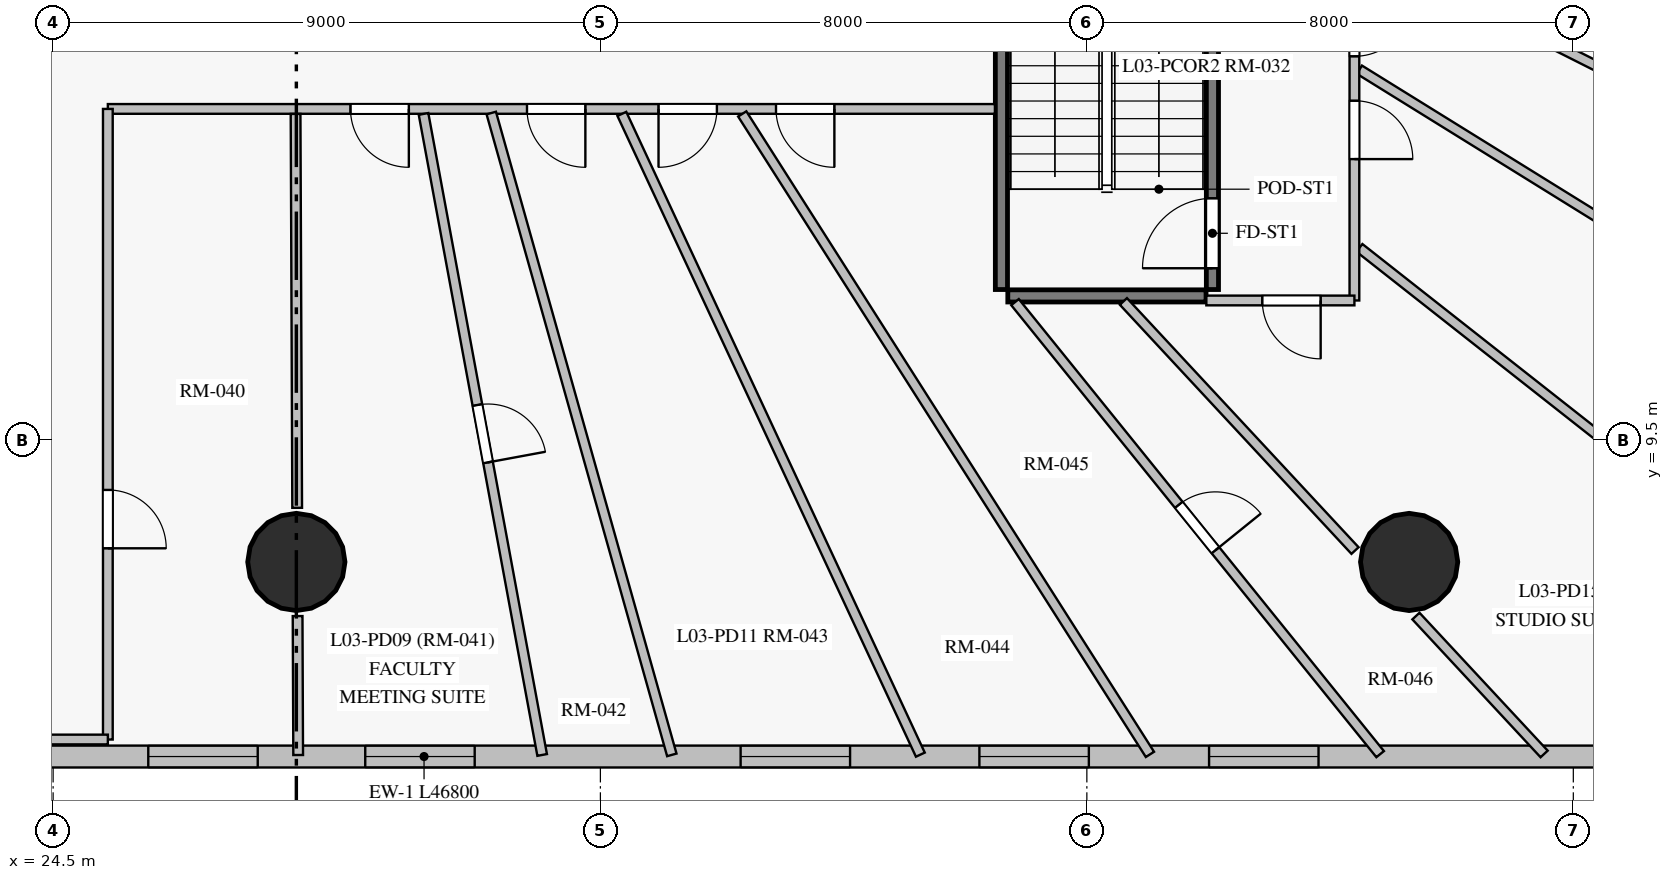
"""IFC4 building model, lengths in metres.
Left out: names, types, materials, properties, quantities, classifications, styles, units other than length and angle.
Written with IfcOpenShell. Run it as: python <this file> out.ifc"""

import sys

from ifc_helpers import new_model, si_unit, direction, frame, frame_2d, origin, origin_with_axes, origin_2d, place, context, subcontext, project, spatial, rectangle, circle, extrude, source, transform, mapped, element, fill, save


model = new_model("IFC4")
c1 = context("Model", 3, precision=1e-05, world=origin(), true_north=direction((0.0, 1.0)))
c2 = subcontext(c1, "Body", "Model", "MODEL_VIEW")
j1 = project(units=[si_unit("LENGTHUNIT", "METRE"), si_unit("PLANEANGLEUNIT", "RADIAN")], contexts=[c1])
p1 = place(None, origin())
s1 = spatial("IfcSite", under=j1, at=p1, CompositionType="ELEMENT")
p2 = place(p1, origin())
s2 = spatial("IfcBuilding", under=s1, at=p2, CompositionType="ELEMENT")
p3 = place(p2, frame((0.0, 0.0, 13.5)))
s3 = spatial("IfcBuildingStorey", under=s2, at=p3, CompositionType="ELEMENT", Elevation=13.5)
m1 = source(origin_with_axes(), c2, "Body", "SweptSolid", [
    extrude(circle(Radius=0.8, at=origin_2d()), origin(), (0.0, 0.0, 1.0), 4.5),
])
for number, where, z_axis, x_axis in (
    (1, (28.5, 7.5, 0.0), (0.0, 0.0, 1.0), (1.0, 0.0, 0.0)),
    (2, (46.8, 7.5, 0.0), (0.0, 0.0, 1.0), (1.0, 0.0, 0.0)),
):
    element("IfcColumn", number, at=place(p3, frame(where, z_axis=z_axis, x_axis=x_axis)), inside=s3, PredefinedType="COLUMN", context=c2, shape_type="MappedRepresentation", body=[
        mapped(m1, transform((0.0, 0.0, 0.0), scale=1.0)),
    ])
p4 = place(p3, frame((7.2, 4.3, 0.0), z_axis=(0.0, 0.0, 1.0), x_axis=(1.0, 0.0, 0.0)))
e3 = element("IfcWall", 3, at=p4, inside=s3, PredefinedType="SOLIDWALL", context=c2, shape_type="SweptSolid", body=[
    extrude(rectangle(XDim=46.8, YDim=0.36, at=frame_2d((23.4, 0.0))), origin(), (0.0, 0.0, 1.0), 4.225),
])
p5 = place(p4, frame((3.305, 0.0, 0.85)))
e4 = element("IfcOpeningElement", 4, at=p5, cuts=e3, PredefinedType="OPENING", context=c2, shape_type="SweptSolid", body=[
    extrude(rectangle(XDim=1.8, YDim=2.2, at=frame_2d((0.9, 1.1))), frame((0.0, 0.19, 0.0), z_axis=(0.0, -1.0, 0.0), x_axis=(1.0, 0.0, 0.0)), (0.0, 0.0, 1.0), 0.38),
])
p6 = place(p4, frame((9.709, 0.0, 0.85)))
e5 = element("IfcOpeningElement", 5, at=p6, cuts=e3, PredefinedType="OPENING", context=c2, shape_type="SweptSolid", body=[
    extrude(rectangle(XDim=1.8, YDim=2.2, at=frame_2d((0.9, 1.1))), frame((0.0, 0.19, 0.0), z_axis=(0.0, -1.0, 0.0), x_axis=(1.0, 0.0, 0.0)), (0.0, 0.0, 1.0), 0.38),
])
p7 = place(p4, frame((15.2, 0.0, 0.85)))
e6 = element("IfcOpeningElement", 6, at=p7, cuts=e3, PredefinedType="OPENING", context=c2, shape_type="SweptSolid", body=[
    extrude(rectangle(XDim=1.8, YDim=2.2, at=frame_2d((0.9, 1.1))), frame((0.0, 0.19, 0.0), z_axis=(0.0, -1.0, 0.0), x_axis=(1.0, 0.0, 0.0)), (0.0, 0.0, 1.0), 0.38),
])
p8 = place(p4, frame((18.865, 0.0, 0.85)))
e7 = element("IfcOpeningElement", 7, at=p8, cuts=e3, PredefinedType="OPENING", context=c2, shape_type="SweptSolid", body=[
    extrude(rectangle(XDim=1.8, YDim=2.2, at=frame_2d((0.9, 1.1))), frame((0.0, 0.19, 0.0), z_axis=(0.0, -1.0, 0.0), x_axis=(1.0, 0.0, 0.0)), (0.0, 0.0, 1.0), 0.38),
])
p9 = place(p4, frame((22.433, 0.0, 0.85)))
e8 = element("IfcOpeningElement", 8, at=p9, cuts=e3, PredefinedType="OPENING", context=c2, shape_type="SweptSolid", body=[
    extrude(rectangle(XDim=1.8, YDim=2.2, at=frame_2d((0.9, 1.1))), frame((0.0, 0.19, 0.0), z_axis=(0.0, -1.0, 0.0), x_axis=(1.0, 0.0, 0.0)), (0.0, 0.0, 1.0), 0.38),
])
p10 = place(p4, frame((28.606, 0.0, 0.85)))
e9 = element("IfcOpeningElement", 9, at=p10, cuts=e3, PredefinedType="OPENING", context=c2, shape_type="SweptSolid", body=[
    extrude(rectangle(XDim=1.8, YDim=2.2, at=frame_2d((0.9, 1.1))), frame((0.0, 0.19, 0.0), z_axis=(0.0, -1.0, 0.0), x_axis=(1.0, 0.0, 0.0)), (0.0, 0.0, 1.0), 0.38),
])
p11 = place(p4, frame((32.533, 0.0, 0.85)))
e10 = element("IfcOpeningElement", 10, at=p11, cuts=e3, PredefinedType="OPENING", context=c2, shape_type="SweptSolid", body=[
    extrude(rectangle(XDim=1.8, YDim=2.2, at=frame_2d((0.9, 1.1))), frame((0.0, 0.19, 0.0), z_axis=(0.0, -1.0, 0.0), x_axis=(1.0, 0.0, 0.0)), (0.0, 0.0, 1.0), 0.38),
])
p12 = place(p4, frame((36.31, 0.0, 0.85)))
e11 = element("IfcOpeningElement", 11, at=p12, cuts=e3, PredefinedType="OPENING", context=c2, shape_type="SweptSolid", body=[
    extrude(rectangle(XDim=1.8, YDim=2.2, at=frame_2d((0.9, 1.1))), frame((0.0, 0.19, 0.0), z_axis=(0.0, -1.0, 0.0), x_axis=(1.0, 0.0, 0.0)), (0.0, 0.0, 1.0), 0.38),
])
p13 = place(p4, frame((43.283, 0.0, 0.85)))
e12 = element("IfcOpeningElement", 12, at=p13, cuts=e3, PredefinedType="OPENING", context=c2, shape_type="SweptSolid", body=[
    extrude(rectangle(XDim=1.8, YDim=2.2, at=frame_2d((0.9, 1.1))), frame((0.0, 0.19, 0.0), z_axis=(0.0, -1.0, 0.0), x_axis=(1.0, 0.0, 0.0)), (0.0, 0.0, 1.0), 0.38),
])
p14 = place(p3, frame((40.095, 11.98, 0.0), z_axis=(0.0, 0.0, 1.0), x_axis=(0.0, 1.0, 0.0)))
e13 = element("IfcWall", 13, at=p14, inside=s3, PredefinedType="SHEAR", context=c2, shape_type="SweptSolid", body=[
    extrude(rectangle(XDim=7.35, YDim=0.2, at=frame_2d((3.675, 0.0))), origin(), (0.0, 0.0, 1.0), 4.225),
])
p15 = place(p3, frame((43.565, 11.98, 0.0), z_axis=(0.0, 0.0, 1.0), x_axis=(0.0, 1.0, 0.0)))
e14 = element("IfcWall", 14, at=p15, inside=s3, PredefinedType="SHEAR", context=c2, shape_type="SweptSolid", body=[
    extrude(rectangle(XDim=7.35, YDim=0.2, at=frame_2d((3.675, 0.0))), origin(), (0.0, 0.0, 1.0), 4.225),
])
p16 = place(p15, frame((0.35, 0.0, 0.0)))
e15 = element("IfcOpeningElement", 15, at=p16, cuts=e14, PredefinedType="OPENING", context=c2, shape_type="SweptSolid", body=[
    extrude(rectangle(XDim=1.15, YDim=2.15, at=frame_2d((0.575, 1.075))), frame((0.0, 0.11, 0.0), z_axis=(0.0, -1.0, 0.0), x_axis=(1.0, 0.0, 0.0)), (0.0, 0.0, 1.0), 0.22),
])
p17 = place(p3, frame((40.2, 11.875, 0.0), z_axis=(0.0, 0.0, 1.0), x_axis=(1.0, 0.0, 0.0)))
e16 = element("IfcWall", 16, at=p17, inside=s3, PredefinedType="SHEAR", context=c2, shape_type="SweptSolid", body=[
    extrude(rectangle(XDim=3.26, YDim=0.2, at=frame_2d((1.63, 0.0))), origin(), (0.0, 0.0, 1.0), 4.225),
])
p18 = place(p3, frame((39.988, 14.95, 0.0), z_axis=(0.0, 0.0, 1.0), x_axis=(-1.0, 0.0, 0.0)))
e17 = element("IfcWall", 17, at=p18, inside=s3, PredefinedType="PARTITIONING", context=c2, shape_type="SweptSolid", body=[
    extrude(rectangle(XDim=14.588, YDim=0.16, at=frame_2d((7.294, 0.0))), origin(), (0.0, 0.0, 1.0), 4.225),
])
p19 = place(p18, frame((9.638, 0.0, 0.0)))
e18 = element("IfcOpeningElement", 18, at=p19, cuts=e17, PredefinedType="OPENING", context=c2, shape_type="SweptSolid", body=[
    extrude(rectangle(XDim=0.96, YDim=2.15, at=frame_2d((0.48, 1.075))), frame((0.0, 0.09, 0.0), z_axis=(0.0, -1.0, 0.0), x_axis=(1.0, 0.0, 0.0)), (0.0, 0.0, 1.0), 0.18),
])
p20 = place(p18, frame((6.735, 0.0, 0.0)))
e19 = element("IfcOpeningElement", 19, at=p20, cuts=e17, PredefinedType="OPENING", context=c2, shape_type="SweptSolid", body=[
    extrude(rectangle(XDim=0.96, YDim=2.15, at=frame_2d((0.48, 1.075))), frame((0.0, 0.09, 0.0), z_axis=(0.0, -1.0, 0.0), x_axis=(1.0, 0.0, 0.0)), (0.0, 0.0, 1.0), 0.18),
])
p21 = place(p18, frame((4.572, 0.0, 0.0)))
e20 = element("IfcOpeningElement", 20, at=p21, cuts=e17, PredefinedType="OPENING", context=c2, shape_type="SweptSolid", body=[
    extrude(rectangle(XDim=0.96, YDim=2.15, at=frame_2d((0.48, 1.075))), frame((0.0, 0.09, 0.0), z_axis=(0.0, -1.0, 0.0), x_axis=(1.0, 0.0, 0.0)), (0.0, 0.0, 1.0), 0.18),
])
p22 = place(p18, frame((2.64, 0.0, 0.0)))
e21 = element("IfcOpeningElement", 21, at=p22, cuts=e17, PredefinedType="OPENING", context=c2, shape_type="SweptSolid", body=[
    extrude(rectangle(XDim=0.96, YDim=2.15, at=frame_2d((0.48, 1.075))), frame((0.0, 0.09, 0.0), z_axis=(0.0, -1.0, 0.0), x_axis=(1.0, 0.0, 0.0)), (0.0, 0.0, 1.0), 0.18),
])
p23 = place(p3, frame((35.833, 14.868, 0.0), z_axis=(0.0, 0.0, 1.0), x_axis=(0.536972913637, -0.843599484364, 0.0)))
e22 = element("IfcWall", 22, at=p23, inside=s3, PredefinedType="PARTITIONING", context=c2, shape_type="SweptSolid", body=[
    extrude(rectangle(XDim=12.485, YDim=0.16, at=frame_2d((6.243, 0.0))), origin(), (0.0, 0.0, 1.0), 4.225),
])
p24 = place(p3, frame((45.982, 12.666, 0.0), z_axis=(0.0, 0.0, 1.0), x_axis=(0.785844350615, -0.618424333776, 0.0)))
e23 = element("IfcWall", 23, at=p24, inside=s3, PredefinedType="PARTITIONING", context=c2, shape_type="SweptSolid", body=[
    extrude(rectangle(XDim=11.641, YDim=0.16, at=frame_2d((5.821, 0.0))), origin(), (0.0, 0.0, 1.0), 4.225),
])
p25 = place(p3, frame((33.853, 14.868, 0.0), z_axis=(0.0, 0.0, 1.0), x_axis=(0.422301287801, -0.906455526941, 0.0)))
e24 = element("IfcWall", 24, at=p25, inside=s3, PredefinedType="PARTITIONING", context=c2, shape_type="SweptSolid", body=[
    extrude(rectangle(XDim=11.624, YDim=0.16, at=frame_2d((5.812, 0.0))), origin(), (0.0, 0.0, 1.0), 4.225),
])
p26 = place(p3, frame((45.982, 15.595, 0.0), z_axis=(0.0, 0.0, 1.0), x_axis=(0.849998298484, -0.526785433145, 0.0)))
e25 = element("IfcWall", 25, at=p26, inside=s3, PredefinedType="PARTITIONING", context=c2, shape_type="SweptSolid", body=[
    extrude(rectangle(XDim=11.274, YDim=0.16, at=frame_2d((5.637, 0.0))), origin(), (0.0, 0.0, 1.0), 4.225),
])
p27 = place(p3, frame((31.706, 14.882, 0.0), z_axis=(0.0, 0.0, 1.0), x_axis=(0.270781041685, -0.962640964983, 0.0)))
e26 = element("IfcWall", 26, at=p27, inside=s3, PredefinedType="PARTITIONING", context=c2, shape_type="SweptSolid", body=[
    extrude(rectangle(XDim=10.965, YDim=0.16, at=frame_2d((5.482, 0.0))), origin(), (0.0, 0.0, 1.0), 4.225),
])
p28 = place(p3, frame((45.982, 17.621, 0.0), z_axis=(0.0, 0.0, 1.0), x_axis=(0.892971532671, -0.450113143375, 0.0)))
e27 = element("IfcWall", 27, at=p28, inside=s3, PredefinedType="PARTITIONING", context=c2, shape_type="SweptSolid", body=[
    extrude(rectangle(XDim=10.735, YDim=0.16, at=frame_2d((5.368, 0.0))), origin(), (0.0, 0.0, 1.0), 4.225),
])
p29 = place(p3, frame((30.592, 14.868, 0.0), z_axis=(0.0, 0.0, 1.0), x_axis=(0.181954705636, -0.983306912971, 0.0)))
e28 = element("IfcWall", 28, at=p29, inside=s3, PredefinedType="PARTITIONING", context=c2, shape_type="SweptSolid", body=[
    extrude(rectangle(XDim=10.721, YDim=0.16, at=frame_2d((5.36, 0.0))), origin(), (0.0, 0.0, 1.0), 4.225),
])
p30 = place(p29, frame((4.868, 0.0, 0.0)))
e29 = element("IfcOpeningElement", 29, at=p30, cuts=e28, PredefinedType="OPENING", context=c2, shape_type="SweptSolid", body=[
    extrude(rectangle(XDim=0.96, YDim=2.15, at=frame_2d((0.48, 1.075))), frame((0.0, 0.09, 0.0), z_axis=(0.0, -1.0, 0.0), x_axis=(1.0, 0.0, 0.0)), (0.0, 0.0, 1.0), 0.18),
])
p31 = place(p3, frame((25.4, 14.95, 0.0), z_axis=(0.0, 0.0, 1.0), x_axis=(0.0, -1.0, 0.0)))
e30 = element("IfcWall", 30, at=p31, inside=s3, PredefinedType="PARTITIONING", context=c2, shape_type="SweptSolid", body=[
    extrude(rectangle(XDim=10.37, YDim=0.16, at=frame_2d((5.185, 0.0))), origin(), (0.0, 0.0, 1.0), 4.225),
])
p32 = place(p31, frame((6.265, 0.0, 0.0)))
e31 = element("IfcOpeningElement", 31, at=p32, cuts=e30, PredefinedType="OPENING", context=c2, shape_type="SweptSolid", body=[
    extrude(rectangle(XDim=0.96, YDim=2.15, at=frame_2d((0.48, 1.075))), frame((0.0, 0.09, 0.0), z_axis=(0.0, -1.0, 0.0), x_axis=(1.0, 0.0, 0.0)), (0.0, 0.0, 1.0), 0.18),
])
p33 = place(p3, frame((40.319, 11.773, 0.0), z_axis=(0.0, 0.0, 1.0), x_axis=(0.628386466177, -0.77790131066, 0.0)))
e32 = element("IfcWall", 32, at=p33, inside=s3, PredefinedType="PARTITIONING", context=c2, shape_type="SweptSolid", body=[
    extrude(rectangle(XDim=9.556, YDim=0.16, at=frame_2d((4.778, 0.0))), origin(), (0.0, 0.0, 1.0), 4.225),
])
p34 = place(p33, frame((4.285, 0.0, 0.0)))
e33 = element("IfcOpeningElement", 33, at=p34, cuts=e32, PredefinedType="OPENING", context=c2, shape_type="SweptSolid", body=[
    extrude(rectangle(XDim=0.96, YDim=2.15, at=frame_2d((0.48, 1.075))), frame((0.0, 0.09, 0.0), z_axis=(0.0, -1.0, 0.0), x_axis=(1.0, 0.0, 0.0)), (0.0, 0.0, 1.0), 0.18),
])
p35 = place(p3, frame((28.487, 14.868, 0.0), z_axis=(0.0, 0.0, 1.0), x_axis=(0.004032529208, -0.999991869321, 0.0)))
e34 = element("IfcWall", 34, at=p35, inside=s3, PredefinedType="PARTITIONING", context=c2, shape_type="SweptSolid", body=[
    extrude(rectangle(XDim=6.478, YDim=0.16, at=frame_2d((3.239, 0.0))), origin(), (0.0, 0.0, 1.0), 3.275),
])
p36 = place(p3, frame((45.9, 18.2, 0.0), z_axis=(0.0, 0.0, 1.0), x_axis=(0.0, -1.0, 0.0)))
e35 = element("IfcWall", 35, at=p36, inside=s3, PredefinedType="PARTITIONING", context=c2, shape_type="SweptSolid", body=[
    extrude(rectangle(XDim=6.4, YDim=0.16, at=frame_2d((3.2, 0.0))), origin(), (0.0, 0.0, 1.0), 4.225),
])
p37 = place(p36, frame((3.115, 0.0, 0.0)))
e36 = element("IfcOpeningElement", 36, at=p37, cuts=e35, PredefinedType="OPENING", context=c2, shape_type="SweptSolid", body=[
    extrude(rectangle(XDim=0.96, YDim=2.15, at=frame_2d((0.48, 1.075))), frame((0.0, 0.09, 0.0), z_axis=(0.0, -1.0, 0.0), x_axis=(1.0, 0.0, 0.0)), (0.0, 0.0, 1.0), 0.18),
])
p38 = place(p36, frame((1.425, 0.0, 0.0)))
e37 = element("IfcOpeningElement", 37, at=p38, cuts=e35, PredefinedType="OPENING", context=c2, shape_type="SweptSolid", body=[
    extrude(rectangle(XDim=0.96, YDim=2.15, at=frame_2d((0.48, 1.075))), frame((0.0, 0.09, 0.0), z_axis=(0.0, -1.0, 0.0), x_axis=(1.0, 0.0, 0.0)), (0.0, 0.0, 1.0), 0.18),
])
p39 = place(p3, frame((42.101, 11.784, 0.0), z_axis=(0.0, 0.0, 1.0), x_axis=(0.680931425019, -0.732347181616, 0.0)))
e38 = element("IfcWall", 38, at=p39, inside=s3, PredefinedType="PARTITIONING", context=c2, shape_type="SweptSolid", body=[
    extrude(rectangle(XDim=5.594, YDim=0.16, at=frame_2d((2.797, 0.0))), origin(), (0.0, 0.0, 1.0), 4.225),
])
p40 = place(p3, frame((25.4, 4.58, 0.0), z_axis=(0.0, 0.0, 1.0), x_axis=(-1.0, 0.0, 0.0)))
e39 = element("IfcWall", 39, at=p40, inside=s3, PredefinedType="PARTITIONING", context=c2, shape_type="SweptSolid", body=[
    extrude(rectangle(XDim=4.2, YDim=0.16, at=frame_2d((2.1, 0.0))), origin(), (0.0, 0.0, 1.0), 4.225),
])
p41 = place(p3, frame((46.912, 6.61, 0.0), z_axis=(0.0, 0.0, 1.0), x_axis=(0.680895523886, -0.732380560605, 0.0)))
e40 = element("IfcWall", 40, at=p41, inside=s3, PredefinedType="PARTITIONING", context=c2, shape_type="SweptSolid", body=[
    extrude(rectangle(XDim=3.096, YDim=0.16, at=frame_2d((1.548, 0.0))), origin(), (0.0, 0.0, 1.0), 4.225),
])
p42 = place(p3, frame((28.521, 6.61, 0.0), z_axis=(0.0, 0.0, 1.0), x_axis=(0.003952960568, -0.999992187021, 0.0)))
e41 = element("IfcWall", 41, at=p42, inside=s3, PredefinedType="PARTITIONING", context=c2, shape_type="SweptSolid", body=[
    extrude(rectangle(XDim=2.285, YDim=0.16, at=frame_2d((1.143, 0.0))), origin(), (0.0, 0.0, 1.0), 4.225),
])
p43 = place(p3, frame((45.9, 11.8, 0.0), z_axis=(0.0, 0.0, 1.0), x_axis=(-1.0, 0.0, 0.0)))
e42 = element("IfcWall", 42, at=p43, inside=s3, PredefinedType="PARTITIONING", context=c2, shape_type="SweptSolid", body=[
    extrude(rectangle(XDim=2.435, YDim=0.16, at=frame_2d((1.217, 0.0))), origin(), (0.0, 0.0, 1.0), 4.225),
])
p44 = place(p43, frame((0.555, 0.0, 0.0)))
e43 = element("IfcOpeningElement", 43, at=p44, cuts=e42, PredefinedType="OPENING", context=c2, shape_type="SweptSolid", body=[
    extrude(rectangle(XDim=0.96, YDim=2.15, at=frame_2d((0.48, 1.075))), frame((0.0, 0.09, 0.0), z_axis=(0.0, -1.0, 0.0), x_axis=(1.0, 0.0, 0.0)), (0.0, 0.0, 1.0), 0.18),
])
m2 = source(origin_with_axes(), c2, "Body", "SweptSolid", [
    extrude(rectangle(XDim=1.8, YDim=2.2, at=frame_2d((0.9, 1.1))), frame((0.0, 0.03, 0.0), z_axis=(0.0, -1.0, 0.0), x_axis=(1.0, 0.0, 0.0)), (0.0, 0.0, 1.0), 0.06),
])
p45 = place(p8, origin())
e44 = element("IfcWindow", 44, at=p45, inside=s3, PartitioningType="SINGLE_PANEL", PredefinedType="WINDOW", context=c2, shape_type="MappedRepresentation", body=[
    mapped(m2, transform((0.0, 0.0, 0.0), scale=1.0)),
])
fill(e7, e44)
p46 = place(p9, origin())
e45 = element("IfcWindow", 45, at=p46, inside=s3, PartitioningType="SINGLE_PANEL", PredefinedType="WINDOW", context=c2, shape_type="MappedRepresentation", body=[
    mapped(m2, transform((0.0, 0.0, 0.0), scale=1.0)),
])
fill(e8, e45)
p47 = place(p10, origin())
e46 = element("IfcWindow", 46, at=p47, inside=s3, PartitioningType="SINGLE_PANEL", PredefinedType="WINDOW", context=c2, shape_type="MappedRepresentation", body=[
    mapped(m2, transform((0.0, 0.0, 0.0), scale=1.0)),
])
fill(e9, e46)
p48 = place(p11, origin())
e47 = element("IfcWindow", 47, at=p48, inside=s3, PartitioningType="SINGLE_PANEL", PredefinedType="WINDOW", context=c2, shape_type="MappedRepresentation", body=[
    mapped(m2, transform((0.0, 0.0, 0.0), scale=1.0)),
])
fill(e10, e47)
p49 = place(p12, origin())
e48 = element("IfcWindow", 48, at=p49, inside=s3, PartitioningType="SINGLE_PANEL", PredefinedType="WINDOW", context=c2, shape_type="MappedRepresentation", body=[
    mapped(m2, transform((0.0, 0.0, 0.0), scale=1.0)),
])
fill(e11, e48)
m3 = source(origin_with_axes(), c2, "Body", "SweptSolid", [
    extrude(rectangle(XDim=1.15, YDim=2.15, at=frame_2d((0.575, 1.075))), frame((0.0, 0.025, 0.0), z_axis=(0.0, -1.0, 0.0), x_axis=(1.0, 0.0, 0.0)), (0.0, 0.0, 1.0), 0.05),
])
p50 = place(p16, origin())
e49 = element("IfcDoor", 49, at=p50, inside=s3, OperationType="SINGLE_SWING_LEFT", PredefinedType="DOOR", context=c2, shape_type="MappedRepresentation", body=[
    mapped(m3, transform((0.0, 0.0, 0.0), scale=1.0)),
])
fill(e15, e49)
m4 = source(origin_with_axes(), c2, "Body", "SweptSolid", [
    extrude(rectangle(XDim=0.96, YDim=2.15, at=frame_2d((0.48, 1.075))), frame((0.0, 0.025, 0.0), z_axis=(0.0, -1.0, 0.0), x_axis=(1.0, 0.0, 0.0)), (0.0, 0.0, 1.0), 0.05),
])
p51 = place(p32, origin())
e50 = element("IfcDoor", 50, at=p51, inside=s3, OperationType="SINGLE_SWING_RIGHT", PredefinedType="DOOR", context=c2, shape_type="MappedRepresentation", body=[
    mapped(m4, transform((0.0, 0.0, 0.0), scale=1.0)),
])
fill(e31, e50)
p52 = place(p19, origin())
e51 = element("IfcDoor", 51, at=p52, inside=s3, OperationType="SINGLE_SWING_LEFT", PredefinedType="DOOR", context=c2, shape_type="MappedRepresentation", body=[
    mapped(m4, transform((0.0, 0.0, 0.0), scale=1.0)),
])
fill(e18, e51)
p53 = place(p30, origin())
e52 = element("IfcDoor", 52, at=p53, inside=s3, OperationType="SINGLE_SWING_RIGHT", PredefinedType="DOOR", context=c2, shape_type="MappedRepresentation", body=[
    mapped(m4, transform((0.0, 0.0, 0.0), scale=1.0)),
])
fill(e29, e52)
p54 = place(p20, origin())
e53 = element("IfcDoor", 53, at=p54, inside=s3, OperationType="SINGLE_SWING_LEFT", PredefinedType="DOOR", context=c2, shape_type="MappedRepresentation", body=[
    mapped(m4, transform((0.0, 0.0, 0.0), scale=1.0)),
])
fill(e19, e53)
p55 = place(p21, origin())
e54 = element("IfcDoor", 54, at=p55, inside=s3, OperationType="SINGLE_SWING_RIGHT", PredefinedType="DOOR", context=c2, shape_type="MappedRepresentation", body=[
    mapped(m4, transform((0.0, 0.0, 0.0), scale=1.0)),
])
fill(e20, e54)
p56 = place(p22, origin())
e55 = element("IfcDoor", 55, at=p56, inside=s3, OperationType="SINGLE_SWING_LEFT", PredefinedType="DOOR", context=c2, shape_type="MappedRepresentation", body=[
    mapped(m4, transform((0.0, 0.0, 0.0), scale=1.0)),
])
fill(e21, e55)
p57 = place(p34, origin())
e56 = element("IfcDoor", 56, at=p57, inside=s3, OperationType="SINGLE_SWING_RIGHT", PredefinedType="DOOR", context=c2, shape_type="MappedRepresentation", body=[
    mapped(m4, transform((0.0, 0.0, 0.0), scale=1.0)),
])
fill(e33, e56)
p58 = place(p44, origin())
e57 = element("IfcDoor", 57, at=p58, inside=s3, OperationType="SINGLE_SWING_LEFT", PredefinedType="DOOR", context=c2, shape_type="MappedRepresentation", body=[
    mapped(m4, transform((0.0, 0.0, 0.0), scale=1.0)),
])
fill(e43, e57)
p59 = place(p37, origin())
e58 = element("IfcDoor", 58, at=p59, inside=s3, OperationType="SINGLE_SWING_RIGHT", PredefinedType="DOOR", context=c2, shape_type="MappedRepresentation", body=[
    mapped(m4, transform((0.0, 0.0, 0.0), scale=1.0)),
])
fill(e36, e58)
p60 = place(p38, origin())
e59 = element("IfcDoor", 59, at=p60, inside=s3, OperationType="SINGLE_SWING_LEFT", PredefinedType="DOOR", context=c2, shape_type="MappedRepresentation", body=[
    mapped(m4, transform((0.0, 0.0, 0.0), scale=1.0)),
])
fill(e37, e59)
save(model, sys.argv[1])
